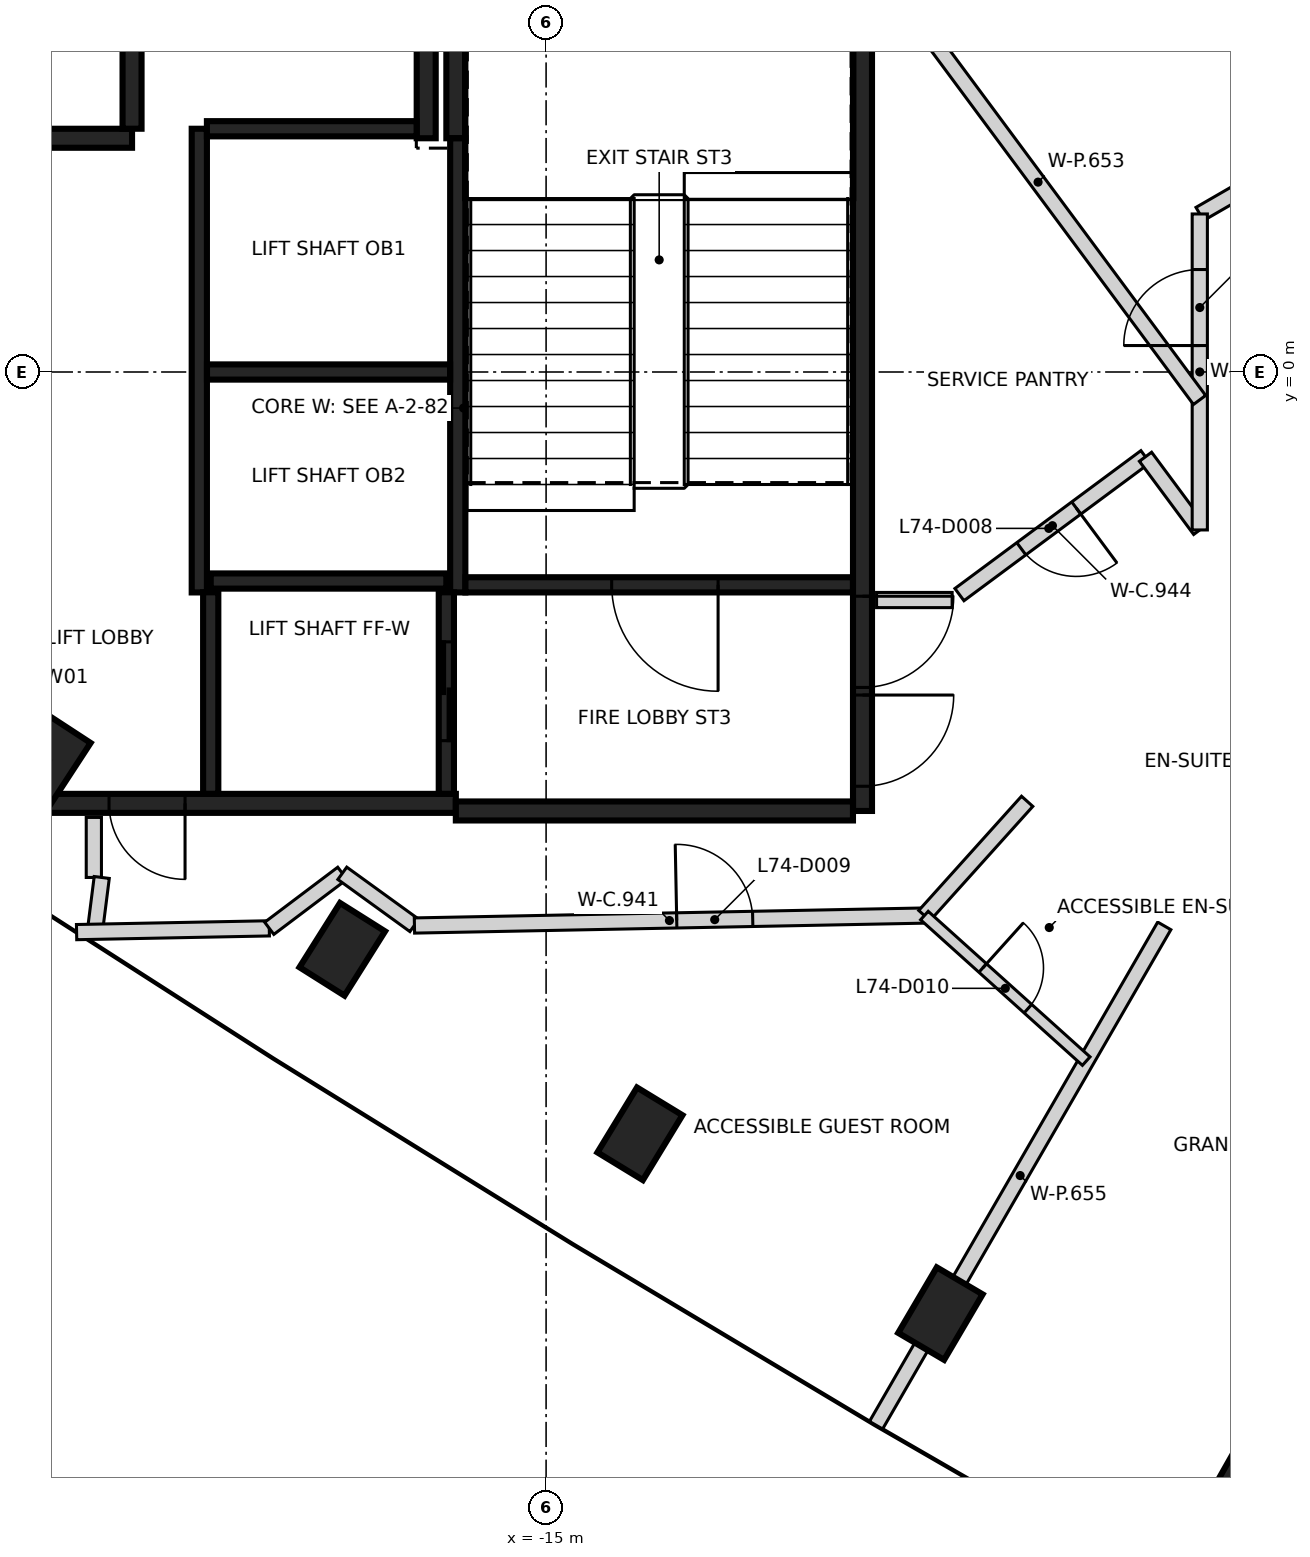
"""IFC4 building model, lengths in metres.
Left out: names, types, materials, properties, quantities, classifications, styles, units other than length and angle.
Written with IfcOpenShell. Run it as: python <this file> out.ifc"""

import sys

from ifc_helpers import new_model, si_unit, direction, frame, frame_2d, origin, origin_2d, place, context, subcontext, project, spatial, rectangle, extrude, element, fill, save


model = new_model("IFC4")
c1 = context("Model", 3, precision=1e-05, world=origin(), true_north=direction((0.0, 1.0)))
c2 = subcontext(c1, "Body", "Model", "MODEL_VIEW")
j1 = project(units=[si_unit("LENGTHUNIT", "METRE"), si_unit("PLANEANGLEUNIT", "RADIAN")], contexts=[c1])
p1 = place(None, origin())
s1 = spatial("IfcSite", under=j1, at=p1, CompositionType="ELEMENT")
p2 = place(p1, origin())
s2 = spatial("IfcBuilding", under=s1, at=p2, CompositionType="ELEMENT")
p3 = place(p2, frame((0.0, 0.0, 294.6)))
s3 = spatial("IfcBuildingStorey", under=s2, at=p3, CompositionType="ELEMENT", Elevation=294.6)
for number, where, z_axis, x_axis in (
    (1, (-21.559, -5.107, -0.35), (0.0, 0.0, 1.0), (0.547, 0.837, 0.0)),
    (2, (-17.681, -7.595, -0.35), (0.0, 0.0, 1.0), (0.533, 0.846, 0.0)),
    (3, (-13.765, -10.022, -0.35), (0.0, 0.0, 1.0), (0.52, 0.854, 0.0)),
    (4, (-9.812, -12.388, -0.35), (0.0, 0.0, 1.0), (0.507, 0.862, 0.0)),
    (5, (-5.822, -14.691, -0.35), (0.0, 0.0, 1.0), (0.493, 0.87, 0.0)),
):
    element("IfcColumn", number, at=place(p3, frame(where, z_axis=z_axis, x_axis=x_axis)), inside=s3, PredefinedType="COLUMN", context=c2, shape_type="SweptSolid", body=[
        extrude(rectangle(XDim=1.0, YDim=0.7, at=origin_2d()), origin(), (0.0, 0.0, 1.0), 3.6),
    ])
p4 = place(p3, frame((-10.837, 5.775, 0.0), z_axis=(0.0, 0.0, 1.0), x_axis=(0.0, -1.0, 0.0)))
e6 = element("IfcWall", 6, at=p4, inside=s3, PredefinedType="SHEAR", context=c2, shape_type="SweptSolid", body=[
    extrude(rectangle(XDim=11.55, YDim=0.25, at=frame_2d((5.775, 0.0))), origin(), (0.0, 0.0, 1.0), 3.25),
])
p5 = place(p4, frame((10.025, 0.0, 0.0)))
e7 = element("IfcOpeningElement", 7, at=p5, cuts=e6, PredefinedType="OPENING", context=c2, shape_type="SweptSolid", body=[
    extrude(rectangle(XDim=1.2, YDim=2.1, at=frame_2d((0.6, 1.05))), frame((0.0, 0.135, 0.0), z_axis=(0.0, -1.0, 0.0), x_axis=(1.0, 0.0, 0.0)), (0.0, 0.0, 1.0), 0.27),
])
p6 = place(p4, frame((8.725, 0.0, 0.0)))
e8 = element("IfcOpeningElement", 8, at=p6, cuts=e6, PredefinedType="OPENING", context=c2, shape_type="SweptSolid", body=[
    extrude(rectangle(XDim=1.2, YDim=2.1, at=frame_2d((0.6, 1.05))), frame((0.0, 0.135, 0.0), z_axis=(0.0, -1.0, 0.0), x_axis=(1.0, 0.0, 0.0)), (0.0, 0.0, 1.0), 0.27),
])
p7 = place(p3, frame((-16.187, -5.675, 0.0), z_axis=(0.0, 0.0, 1.0), x_axis=(-1.0, 0.0, 0.0)))
e9 = element("IfcWall", 9, at=p7, inside=s3, PredefinedType="SHEAR", context=c2, shape_type="SweptSolid", body=[
    extrude(rectangle(XDim=6.125, YDim=0.25, at=frame_2d((3.062, 0.0))), origin(), (0.0, 0.0, 1.0), 3.25),
])
p8 = place(p7, frame((3.563, 0.0, 0.0)))
e10 = element("IfcOpeningElement", 10, at=p8, cuts=e9, PredefinedType="OPENING", context=c2, shape_type="SweptSolid", body=[
    extrude(rectangle(XDim=1.0, YDim=2.1, at=frame_2d((0.5, 1.05))), frame((0.0, 0.135, 0.0), z_axis=(0.0, -1.0, 0.0), x_axis=(1.0, 0.0, 0.0)), (0.0, 0.0, 1.0), 0.27),
])
p9 = place(p3, frame((-10.963, -5.775, 0.0), z_axis=(0.0, 0.0, 1.0), x_axis=(-1.0, 0.0, 0.0)))
e11 = element("IfcWall", 11, at=p9, inside=s3, PredefinedType="SHEAR", context=c2, shape_type="SweptSolid", body=[
    extrude(rectangle(XDim=5.225, YDim=0.25, at=frame_2d((2.612, 0.0))), origin(), (0.0, 0.0, 1.0), 3.25),
])
p10 = place(p3, frame((-16.187, 3.075, 0.0), z_axis=(0.0, 0.0, 1.0), x_axis=(0.0, 1.0, 0.0)))
e12 = element("IfcWall", 12, at=p10, inside=s3, PredefinedType="SHEAR", context=c2, shape_type="SweptSolid", body=[
    extrude(rectangle(XDim=2.575, YDim=0.25, at=frame_2d((1.287, 0.0))), origin(), (0.0, 0.0, 1.0), 3.25),
])
p11 = place(p3, frame((-22.312, 3.075, 0.0), z_axis=(0.0, 0.0, 1.0), x_axis=(1.0, 0.0, 0.0)))
e13 = element("IfcWall", 13, at=p11, inside=s3, PredefinedType="SHEAR", context=c2, shape_type="SweptSolid", body=[
    extrude(rectangle(XDim=1.865, YDim=0.25, at=frame_2d((0.932, 0.0))), origin(), (0.0, 0.0, 1.0), 3.25),
])
p12 = place(p3, frame((-16.577, 4.785, 0.0), z_axis=(0.0, 0.0, 1.0), x_axis=(0.0, -1.0, 0.0)))
e14 = element("IfcWall", 14, at=p12, inside=s3, PredefinedType="SHEAR", context=c2, shape_type="SweptSolid", body=[
    extrude(rectangle(XDim=1.71, YDim=0.25, at=frame_2d((0.855, 0.0))), origin(), (0.0, 0.0, 1.0), 3.25),
])
p13 = place(p3, frame((-20.447, 3.2, 0.0), z_axis=(0.0, 0.0, 1.0), x_axis=(0.0, 1.0, 0.0)))
e15 = element("IfcWall", 15, at=p13, inside=s3, PredefinedType="SHEAR", context=c2, shape_type="SweptSolid", body=[
    extrude(rectangle(XDim=1.584, YDim=0.25, at=frame_2d((0.792, 0.0))), origin(), (0.0, 0.0, 1.0), 3.25),
])
p14 = place(p3, frame((-16.162, 3.074, 0.0), z_axis=(0.0, 0.0, 1.0), x_axis=(0.0, -1.0, 0.0)))
e16 = element("IfcWall", 16, at=p14, inside=s3, PredefinedType="SHEAR", context=c2, shape_type="SweptSolid", body=[
    extrude(rectangle(XDim=5.974, YDim=0.2, at=frame_2d((2.987, 0.0))), origin(), (0.0, 0.0, 1.0), 3.25),
])
p15 = place(p3, frame((-19.562, -2.9, 0.0), z_axis=(0.0, 0.0, 1.0), x_axis=(0.0, 1.0, 0.0)))
e17 = element("IfcWall", 17, at=p15, inside=s3, PredefinedType="SHEAR", context=c2, shape_type="SweptSolid", body=[
    extrude(rectangle(XDim=6.1, YDim=0.2, at=frame_2d((3.05, 0.0))), origin(), (0.0, 0.0, 1.0), 3.25),
])
p16 = place(p3, frame((-10.963, -2.8, 0.0), z_axis=(0.0, 0.0, 1.0), x_axis=(-1.0, 0.0, 0.0)))
e18 = element("IfcWall", 18, at=p16, inside=s3, PredefinedType="SHEAR", context=c2, shape_type="SweptSolid", body=[
    extrude(rectangle(XDim=5.098, YDim=0.2, at=frame_2d((2.549, 0.0))), origin(), (0.0, 0.0, 1.0), 3.25),
])
p17 = place(p16, frame((1.774, 0.0, 0.0)))
e19 = element("IfcOpeningElement", 19, at=p17, cuts=e18, PredefinedType="OPENING", context=c2, shape_type="SweptSolid", body=[
    extrude(rectangle(XDim=1.4, YDim=2.1, at=frame_2d((0.7, 1.05))), frame((0.0, 0.11, 0.0), z_axis=(0.0, -1.0, 0.0), x_axis=(1.0, 0.0, 0.0)), (0.0, 0.0, 1.0), 0.22),
])
p18 = place(p3, frame((-16.263, 0.0, 0.0), z_axis=(0.0, 0.0, 1.0), x_axis=(-1.0, 0.0, 0.0)))
e20 = element("IfcWall", 20, at=p18, inside=s3, PredefinedType="SHEAR", context=c2, shape_type="SweptSolid", body=[
    extrude(rectangle(XDim=3.198, YDim=0.2, at=frame_2d((1.599, 0.0))), origin(), (0.0, 0.0, 1.0), 3.25),
])
p19 = place(p3, frame((-19.462, 3.2, 0.0), z_axis=(0.0, 0.0, 1.0), x_axis=(1.0, 0.0, 0.0)))
e21 = element("IfcWall", 21, at=p19, inside=s3, PredefinedType="SHEAR", context=c2, shape_type="SweptSolid", body=[
    extrude(rectangle(XDim=2.759, YDim=0.2, at=frame_2d((1.379, 0.0))), origin(), (0.0, 0.0, 1.0), 3.25),
])
p20 = place(p3, frame((-19.412, -2.75, 0.0), z_axis=(0.0, 0.0, 1.0), x_axis=(1.0, 0.0, 0.0)))
e22 = element("IfcWall", 22, at=p20, inside=s3, PredefinedType="SHEAR", context=c2, shape_type="SweptSolid", body=[
    extrude(rectangle(XDim=3.1, YDim=0.2, at=frame_2d((1.55, 0.0))), origin(), (0.0, 0.0, 1.0), 3.25),
])
p21 = place(p3, frame((-16.312, -2.898, 0.0), z_axis=(0.0, 0.0, 1.0), x_axis=(0.0, -1.0, 0.0)))
e23 = element("IfcWall", 23, at=p21, inside=s3, PredefinedType="SHEAR", context=c2, shape_type="SweptSolid", body=[
    extrude(rectangle(XDim=2.651, YDim=0.2, at=frame_2d((1.325, 0.0))), origin(), (0.0, 0.0, 1.0), 3.25),
])
p22 = place(p21, frame((0.652, 0.0, 0.0)))
e24 = element("IfcOpeningElement", 24, at=p22, cuts=e23, PredefinedType="OPENING", context=c2, shape_type="SweptSolid", body=[
    extrude(rectangle(XDim=1.3, YDim=2.1, at=frame_2d((0.65, 1.05))), frame((0.0, 0.11, 0.0), z_axis=(0.0, -1.0, 0.0), x_axis=(1.0, 0.0, 0.0)), (0.0, 0.0, 1.0), 0.22),
])
p23 = place(p3, frame((-19.412, -5.549, 0.0), z_axis=(0.0, 0.0, 1.0), x_axis=(0.0, 1.0, 0.0)))
e25 = element("IfcWall", 25, at=p23, inside=s3, PredefinedType="SHEAR", context=c2, shape_type="SweptSolid", body=[
    extrude(rectangle(XDim=2.651, YDim=0.2, at=frame_2d((1.325, 0.0))), origin(), (0.0, 0.0, 1.0), 3.25),
])
p24 = place(p3, frame((-20.95, -6.65, 0.0), z_axis=(0.0, 0.0, 1.0), x_axis=(0.0, 1.0, 0.0)))
e26 = element("IfcWall", 26, at=p24, inside=s3, PredefinedType="PARTITIONING", context=c2, shape_type="SweptSolid", body=[
    extrude(rectangle(XDim=0.79, YDim=0.2, at=frame_2d((0.395, 0.0))), origin(), (0.0, 0.0, 1.0), 3.25),
])
p25 = place(p3, frame((-20.929, -7.305, 0.0), z_axis=(0.0, 0.0, 1.0), x_axis=(0.125718385971, 0.992065969293, 0.0)))
e27 = element("IfcWall", 27, at=p25, inside=s3, PredefinedType="PARTITIONING", context=c2, shape_type="SweptSolid", body=[
    extrude(rectangle(XDim=0.66, YDim=0.2, at=frame_2d((0.33, 0.0))), origin(), (0.0, 0.0, 1.0), 3.25),
])
p26 = place(p3, frame((-21.177, -7.369, 0.0), z_axis=(0.0, 0.0, 1.0), x_axis=(0.999808930271, 0.019547453804, 0.0)))
e28 = element("IfcWall", 28, at=p26, inside=s3, PredefinedType="PARTITIONING", context=c2, shape_type="SweptSolid", body=[
    extrude(rectangle(XDim=2.535, YDim=0.2, at=frame_2d((1.268, 0.0))), origin(), (0.0, 0.0, 1.0), 3.25),
])
p27 = place(p3, frame((-18.642, -7.319, 0.0), z_axis=(0.0, 0.0, 1.0), x_axis=(0.798707882989, 0.601718968998, 0.0)))
e29 = element("IfcWall", 29, at=p27, inside=s3, PredefinedType="PARTITIONING", context=c2, shape_type="SweptSolid", body=[
    extrude(rectangle(XDim=1.203, YDim=0.2, at=frame_2d((0.602, 0.0))), origin(), (0.0, 0.0, 1.0), 2.35),
])
p28 = place(p3, frame((-17.681, -6.595, 0.0), z_axis=(0.0, 0.0, 1.0), x_axis=(0.810123213102, -0.586259652026, 0.0)))
e30 = element("IfcWall", 30, at=p28, inside=s3, PredefinedType="PARTITIONING", context=c2, shape_type="SweptSolid", body=[
    extrude(rectangle(XDim=1.17, YDim=0.2, at=frame_2d((0.585, 0.0))), origin(), (0.0, 0.0, 1.0), 3.25),
])
p29 = place(p3, frame((-16.732, -7.282, 0.0), z_axis=(0.0, 0.0, 1.0), x_axis=(0.999809119854, 0.019537754635, 0.0)))
e31 = element("IfcWall", 31, at=p29, inside=s3, PredefinedType="PARTITIONING", context=c2, shape_type="SweptSolid", body=[
    extrude(rectangle(XDim=6.71, YDim=0.2, at=frame_2d((3.355, 0.0))), origin(), (0.0, 0.0, 1.0), 3.25),
])
p30 = place(p29, frame((3.451, 0.0, 0.0)))
e32 = element("IfcOpeningElement", 32, at=p30, cuts=e31, PredefinedType="OPENING", context=c2, shape_type="SweptSolid", body=[
    extrude(rectangle(XDim=1.0, YDim=2.1, at=frame_2d((0.5, 1.05))), frame((0.0, 0.11, 0.0), z_axis=(0.0, -1.0, 0.0), x_axis=(1.0, 0.0, 0.0)), (0.0, 0.0, 1.0), 0.22),
])
p31 = place(p3, frame((-10.652, -3.0, 0.0), z_axis=(0.0, 0.0, 1.0), x_axis=(1.0, 0.0, 0.0)))
e33 = element("IfcWall", 33, at=p31, inside=s3, PredefinedType="PARTITIONING", context=c2, shape_type="SweptSolid", body=[
    extrude(rectangle(XDim=0.994, YDim=0.2, at=frame_2d((0.497, 0.0))), origin(), (0.0, 0.0, 1.0), 3.25),
])
p32 = place(p3, frame((-10.023, -7.151, 0.0), z_axis=(0.0, 0.0, 1.0), x_axis=(0.668804583793, 0.743438248073, 0.0)))
e34 = element("IfcWall", 34, at=p32, inside=s3, PredefinedType="PARTITIONING", context=c2, shape_type="SweptSolid", body=[
    extrude(rectangle(XDim=2.021, YDim=0.2, at=frame_2d((1.011, 0.0))), origin(), (0.0, 0.0, 1.0), 3.25),
])
p33 = place(p3, frame((-7.115, -1.115, 0.0), z_axis=(0.0, 0.0, 1.0), x_axis=(-0.803344165632, -0.595515030495, 0.0)))
e35 = element("IfcWall", 35, at=p33, inside=s3, PredefinedType="PARTITIONING", context=c2, shape_type="SweptSolid", body=[
    extrude(rectangle(XDim=3.046, YDim=0.2, at=frame_2d((1.523, 0.0))), origin(), (0.0, 0.0, 1.0), 3.25),
])
p34 = place(p33, frame((1.133, 0.0, 0.0)))
e36 = element("IfcOpeningElement", 36, at=p34, cuts=e35, PredefinedType="OPENING", context=c2, shape_type="SweptSolid", body=[
    extrude(rectangle(XDim=0.9, YDim=2.1, at=frame_2d((0.45, 1.05))), frame((0.0, 0.11, 0.0), z_axis=(0.0, -1.0, 0.0), x_axis=(1.0, 0.0, 0.0)), (0.0, 0.0, 1.0), 0.22),
])
p35 = place(p3, frame((-7.114, -1.115, 0.0), z_axis=(0.0, 0.0, 1.0), x_axis=(0.595690139668, -0.803214328496, 0.0)))
e37 = element("IfcWall", 37, at=p35, inside=s3, PredefinedType="PARTITIONING", context=c2, shape_type="SweptSolid", body=[
    extrude(rectangle(XDim=1.199, YDim=0.2, at=frame_2d((0.599, 0.0))), origin(), (0.0, 0.0, 1.0), 3.25),
])
p36 = place(p3, frame((-6.4, 2.079, 0.0), z_axis=(0.0, 0.0, 1.0), x_axis=(0.866037708501, 0.499978687001, 0.0)))
e38 = element("IfcWall", 38, at=p36, inside=s3, PredefinedType="PARTITIONING", context=c2, shape_type="SweptSolid", body=[
    extrude(rectangle(XDim=6.818, YDim=0.2, at=frame_2d((3.409, 0.0))), origin(), (0.0, 0.0, 1.0), 3.25),
])
p37 = place(p36, frame((4.003, 0.0, 0.0)))
e39 = element("IfcOpeningElement", 39, at=p37, cuts=e38, PredefinedType="OPENING", context=c2, shape_type="SweptSolid", body=[
    extrude(rectangle(XDim=1.0, YDim=2.1, at=frame_2d((0.5, 1.05))), frame((0.0, 0.11, 0.0), z_axis=(0.0, -1.0, 0.0), x_axis=(1.0, 0.0, 0.0)), (0.0, 0.0, 1.0), 0.22),
])
p38 = place(p3, frame((-6.4, -2.078, 0.0), z_axis=(0.0, 0.0, 1.0), x_axis=(0.0, 1.0, 0.0)))
e40 = element("IfcWall", 40, at=p38, inside=s3, PredefinedType="PARTITIONING", context=c2, shape_type="SweptSolid", body=[
    extrude(rectangle(XDim=4.157, YDim=0.2, at=frame_2d((2.079, 0.0))), origin(), (0.0, 0.0, 1.0), 3.25),
])
p39 = place(p38, frame((2.426, 0.0, 0.0)))
e41 = element("IfcOpeningElement", 41, at=p39, cuts=e40, PredefinedType="OPENING", context=c2, shape_type="SweptSolid", body=[
    extrude(rectangle(XDim=1.0, YDim=2.1, at=frame_2d((0.5, 1.05))), frame((0.0, 0.11, 0.0), z_axis=(0.0, -1.0, 0.0), x_axis=(1.0, 0.0, 0.0)), (0.0, 0.0, 1.0), 0.22),
])
p40 = place(p3, frame((-10.652, 5.364, 0.0), z_axis=(0.0, 0.0, 1.0), x_axis=(0.595550732464, -0.803317698711, 0.0)))
e42 = element("IfcWall", 42, at=p40, inside=s3, PredefinedType="PARTITIONING", context=c2, shape_type="SweptSolid", body=[
    extrude(rectangle(XDim=7.135, YDim=0.2, at=frame_2d((3.567, 0.0))), origin(), (0.0, 0.0, 1.0), 3.25),
])
p41 = place(p3, frame((-10.659, 13.856, 0.0), z_axis=(0.0, 0.0, 1.0), x_axis=(0.500004723409, -0.866022676706, 0.0)))
e43 = element("IfcWall", 43, at=p41, inside=s3, PredefinedType="PARTITIONING", context=c2, shape_type="SweptSolid", body=[
    extrude(rectangle(XDim=12.329, YDim=0.2, at=frame_2d((6.164, 0.0))), origin(), (0.0, 0.0, 1.0), 3.25),
])
p42 = place(p3, frame((-10.659, -13.856, 0.0), z_axis=(0.0, 0.0, 1.0), x_axis=(0.49995742368, 0.866049983839, 0.0)))
e44 = element("IfcWall", 44, at=p42, inside=s3, PredefinedType="PARTITIONING", context=c2, shape_type="SweptSolid", body=[
    extrude(rectangle(XDim=7.585, YDim=0.2, at=frame_2d((3.792, 0.0))), origin(), (0.0, 0.0, 1.0), 3.25),
])
p43 = place(p3, frame((-6.67, -16.159, 0.0), z_axis=(0.0, 0.0, 1.0), x_axis=(0.500017276951, 0.866015428702, 0.0)))
e45 = element("IfcWall", 45, at=p43, inside=s3, PredefinedType="PARTITIONING", context=c2, shape_type="SweptSolid", body=[
    extrude(rectangle(XDim=12.329, YDim=0.2, at=frame_2d((6.165, 0.0))), origin(), (0.0, 0.0, 1.0), 3.25),
])
p44 = place(p3, frame((-10.023, -7.151, 0.0), z_axis=(0.0, 0.0, 1.0), x_axis=(0.743463699468, -0.668776291127, 0.0)))
e46 = element("IfcWall", 46, at=p44, inside=s3, PredefinedType="PARTITIONING", context=c2, shape_type="SweptSolid", body=[
    extrude(rectangle(XDim=2.864, YDim=0.15, at=frame_2d((1.432, 0.0))), origin(), (0.0, 0.0, 1.0), 3.25),
])
p45 = place(p44, frame((1.032, 0.0, 0.0)))
e47 = element("IfcOpeningElement", 47, at=p45, cuts=e46, PredefinedType="OPENING", context=c2, shape_type="SweptSolid", body=[
    extrude(rectangle(XDim=0.8, YDim=2.1, at=frame_2d((0.4, 1.05))), frame((0.0, 0.085, 0.0), z_axis=(0.0, -1.0, 0.0), x_axis=(1.0, 0.0, 0.0)), (0.0, 0.0, 1.0), 0.17),
])
p46 = place(p22, origin())
e48 = element("IfcDoor", 48, at=p46, inside=s3, OperationType="SLIDING_TO_RIGHT", PredefinedType="DOOR", context=c2, shape_type="SweptSolid", body=[
    extrude(rectangle(XDim=1.3, YDim=2.1, at=frame_2d((0.65, 1.05))), frame((0.0, 0.025, 0.0), z_axis=(0.0, -1.0, 0.0), x_axis=(1.0, 0.0, 0.0)), (0.0, 0.0, 1.0), 0.05),
])
fill(e24, e48)
p47 = place(p8, origin())
e49 = element("IfcDoor", 49, at=p47, inside=s3, OperationType="SINGLE_SWING_LEFT", PredefinedType="DOOR", context=c2, shape_type="SweptSolid", body=[
    extrude(rectangle(XDim=1.0, YDim=2.1, at=frame_2d((0.5, 1.05))), frame((0.0, 0.025, 0.0), z_axis=(0.0, -1.0, 0.0), x_axis=(1.0, 0.0, 0.0)), (0.0, 0.0, 1.0), 0.05),
])
fill(e10, e49)
p48 = place(p5, origin())
e50 = element("IfcDoor", 50, at=p48, inside=s3, OperationType="SINGLE_SWING_LEFT", PredefinedType="DOOR", context=c2, shape_type="SweptSolid", body=[
    extrude(rectangle(XDim=1.2, YDim=2.1, at=frame_2d((0.6, 1.05))), frame((0.0, 0.025, 0.0), z_axis=(0.0, -1.0, 0.0), x_axis=(1.0, 0.0, 0.0)), (0.0, 0.0, 1.0), 0.05),
])
fill(e7, e50)
p49 = place(p6, origin())
e51 = element("IfcDoor", 51, at=p49, inside=s3, OperationType="SINGLE_SWING_RIGHT", PredefinedType="DOOR", context=c2, shape_type="SweptSolid", body=[
    extrude(rectangle(XDim=1.2, YDim=2.1, at=frame_2d((0.6, 1.05))), frame((0.0, 0.025, 0.0), z_axis=(0.0, -1.0, 0.0), x_axis=(1.0, 0.0, 0.0)), (0.0, 0.0, 1.0), 0.05),
])
fill(e8, e51)
p50 = place(p17, origin())
e52 = element("IfcDoor", 52, at=p50, inside=s3, OperationType="SINGLE_SWING_RIGHT", PredefinedType="DOOR", context=c2, shape_type="SweptSolid", body=[
    extrude(rectangle(XDim=1.4, YDim=2.1, at=frame_2d((0.7, 1.05))), frame((0.0, 0.025, 0.0), z_axis=(0.0, -1.0, 0.0), x_axis=(1.0, 0.0, 0.0)), (0.0, 0.0, 1.0), 0.05),
])
fill(e19, e52)
p51 = place(p39, origin())
e53 = element("IfcDoor", 53, at=p51, inside=s3, OperationType="SINGLE_SWING_LEFT", PredefinedType="DOOR", context=c2, shape_type="SweptSolid", body=[
    extrude(rectangle(XDim=1.0, YDim=2.1, at=frame_2d((0.5, 1.05))), frame((0.0, 0.025, 0.0), z_axis=(0.0, -1.0, 0.0), x_axis=(1.0, 0.0, 0.0)), (0.0, 0.0, 1.0), 0.05),
])
fill(e41, e53)
p52 = place(p34, origin())
e54 = element("IfcDoor", 54, at=p52, inside=s3, OperationType="SINGLE_SWING_LEFT", PredefinedType="DOOR", context=c2, shape_type="SweptSolid", body=[
    extrude(rectangle(XDim=0.9, YDim=2.1, at=frame_2d((0.45, 1.05))), frame((0.0, 0.025, 0.0), z_axis=(0.0, -1.0, 0.0), x_axis=(1.0, 0.0, 0.0)), (0.0, 0.0, 1.0), 0.05),
])
fill(e36, e54)
p53 = place(p30, frame((1.0, 0.0, 0.0), z_axis=(0.0, 0.0, 1.0), x_axis=(-1.0, 0.0, 0.0)))
e55 = element("IfcDoor", 55, at=p53, inside=s3, OperationType="SINGLE_SWING_LEFT", PredefinedType="DOOR", context=c2, shape_type="SweptSolid", body=[
    extrude(rectangle(XDim=1.0, YDim=2.1, at=frame_2d((0.5, 1.05))), frame((0.0, 0.025, 0.0), z_axis=(0.0, -1.0, 0.0), x_axis=(1.0, 0.0, 0.0)), (0.0, 0.0, 1.0), 0.05),
])
fill(e32, e55)
p54 = place(p45, frame((0.8, 0.0, 0.0), z_axis=(0.0, 0.0, 1.0), x_axis=(-1.0, 0.0, 0.0)))
e56 = element("IfcDoor", 56, at=p54, inside=s3, OperationType="SINGLE_SWING_LEFT", PredefinedType="DOOR", context=c2, shape_type="SweptSolid", body=[
    extrude(rectangle(XDim=0.8, YDim=2.1, at=frame_2d((0.4, 1.05))), frame((0.0, 0.025, 0.0), z_axis=(0.0, -1.0, 0.0), x_axis=(1.0, 0.0, 0.0)), (0.0, 0.0, 1.0), 0.05),
])
fill(e47, e56)
save(model, sys.argv[1])
